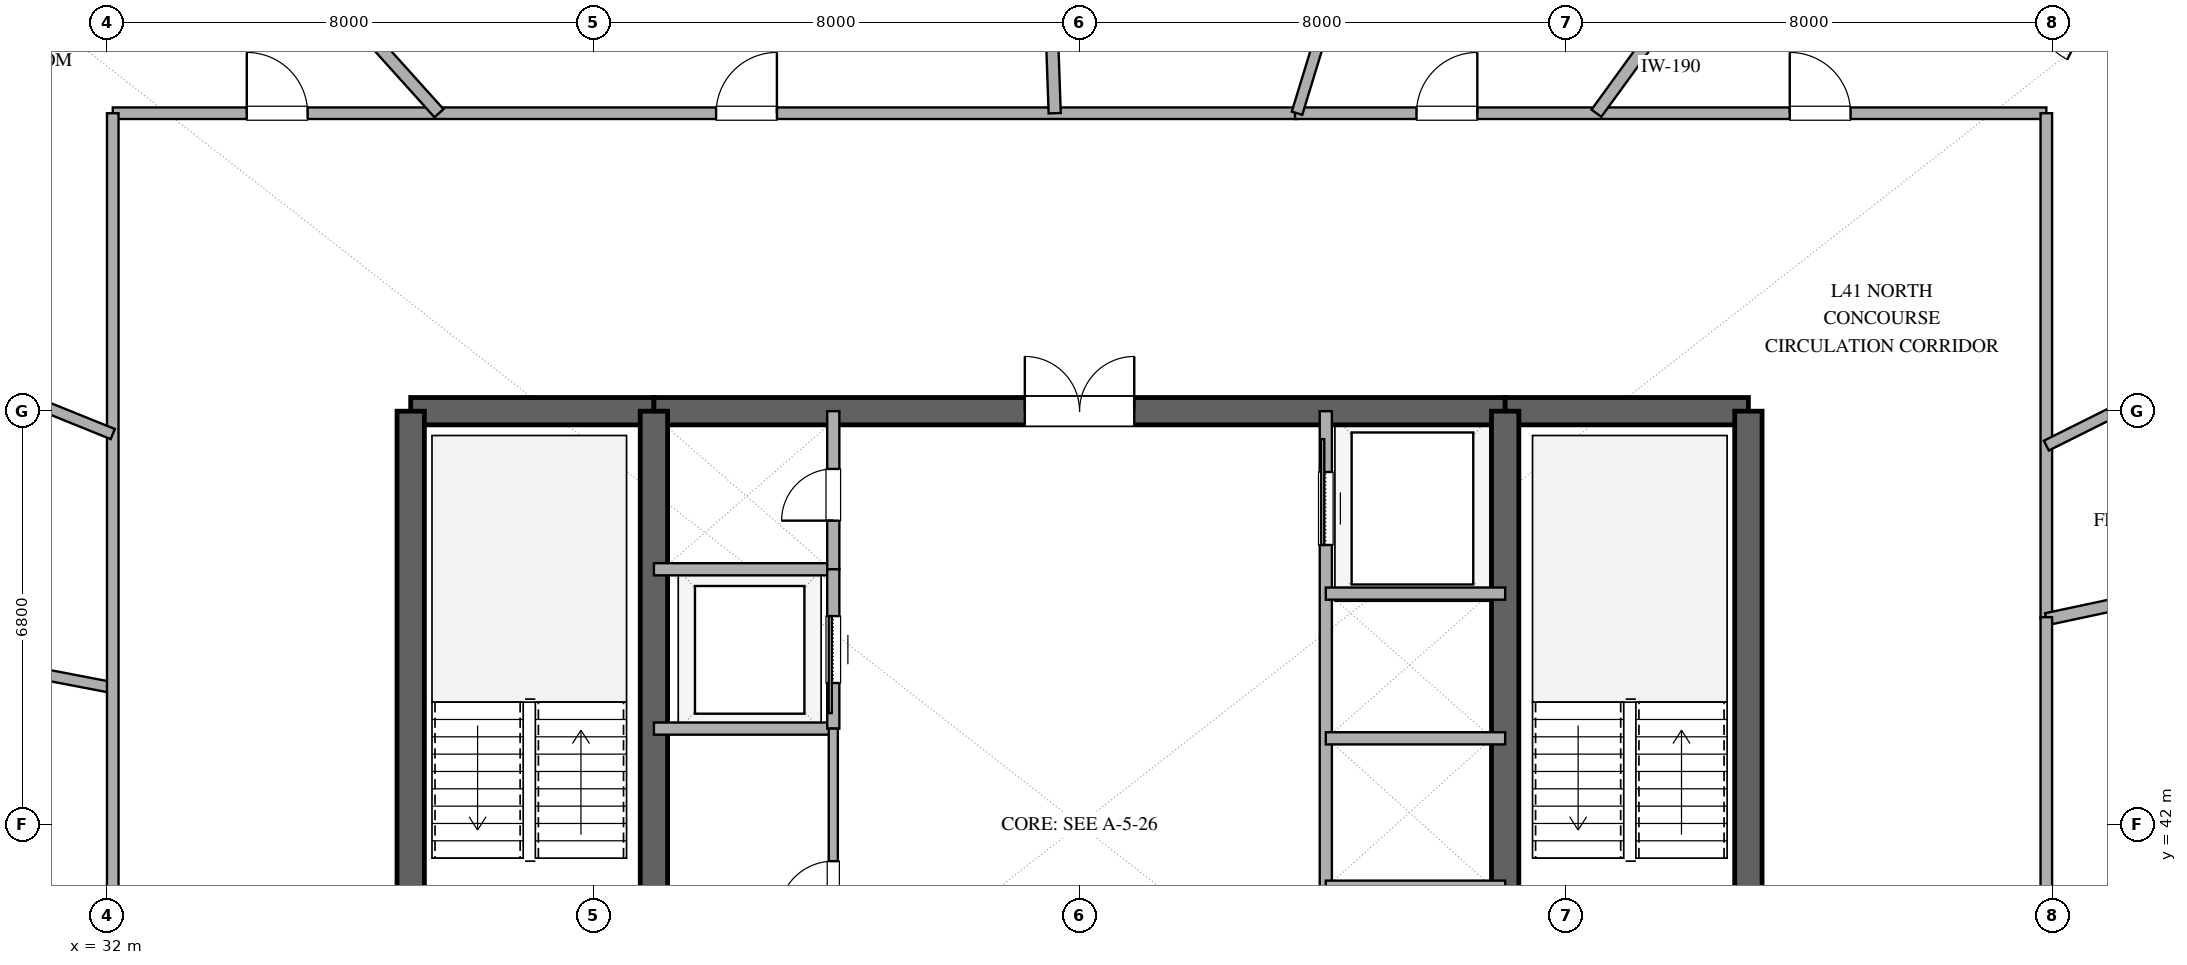
"""IFC4 building model, lengths in metres.
Left out: names, types, materials, properties, quantities, classifications, styles, units other than length and angle.
Written with IfcOpenShell. Run it as: python <this file> out.ifc"""

import sys

from ifc_helpers import new_model, si_unit, direction, frame, frame_2d, origin, place, context, subcontext, project, spatial, rectangle, extrude, element, fill, save


model = new_model("IFC4")
c1 = context("Model", 3, precision=1e-05, world=origin(), true_north=direction((0.0, 1.0)))
c2 = subcontext(c1, "Body", "Model", "MODEL_VIEW")
j1 = project(units=[si_unit("LENGTHUNIT", "METRE"), si_unit("PLANEANGLEUNIT", "RADIAN")], contexts=[c1])
p1 = place(None, origin())
s1 = spatial("IfcSite", under=j1, at=p1, CompositionType="ELEMENT")
p2 = place(p1, origin())
s2 = spatial("IfcBuilding", under=s1, at=p2, CompositionType="ELEMENT")
p3 = place(p2, frame((0.0, 0.0, 165.0)))
s3 = spatial("IfcBuildingStorey", under=s2, at=p3, CompositionType="ELEMENT", Elevation=165.0)
p4 = place(p3, frame((37.0, 48.8, 0.0), z_axis=(0.0, 0.0, 1.0), x_axis=(1.0, 0.0, 0.0)))
e1 = element("IfcWall", 1, at=p4, inside=s3, PredefinedType="SHEAR", context=c2, shape_type="SweptSolid", body=[
    extrude(rectangle(XDim=4.0, YDim=0.45, at=frame_2d((2.0, 0.0))), origin(), (0.0, 0.0, 1.0), 3.38),
])
p5 = place(p3, frame((41.0, 48.8, 0.0), z_axis=(0.0, 0.0, 1.0), x_axis=(1.0, 0.0, 0.0)))
e2 = element("IfcWall", 2, at=p5, inside=s3, PredefinedType="SHEAR", context=c2, shape_type="SweptSolid", body=[
    extrude(rectangle(XDim=14.0, YDim=0.45, at=frame_2d((7.0, 0.0))), origin(), (0.0, 0.0, 1.0), 3.38),
])
p6 = place(p5, frame((6.1, 0.0, 0.0)))
e3 = element("IfcOpeningElement", 3, at=p6, cuts=e2, PredefinedType="OPENING", context=c2, shape_type="SweptSolid", body=[
    extrude(rectangle(XDim=1.8, YDim=2.25, at=frame_2d((0.9, 1.125))), frame((0.0, 0.235, 0.0), z_axis=(0.0, -1.0, 0.0), x_axis=(1.0, 0.0, 0.0)), (0.0, 0.0, 1.0), 0.47),
])
p7 = place(p3, frame((55.0, 48.8, 0.0), z_axis=(0.0, 0.0, 1.0), x_axis=(1.0, 0.0, 0.0)))
e4 = element("IfcWall", 4, at=p7, inside=s3, PredefinedType="SHEAR", context=c2, shape_type="SweptSolid", body=[
    extrude(rectangle(XDim=4.0, YDim=0.45, at=frame_2d((2.0, 0.0))), origin(), (0.0, 0.0, 1.0), 3.38),
])
for number, where, z_axis, x_axis in (
    (5, (37.0, 35.2, 0.0), (0.0, 0.0, 1.0), (0.0, 1.0, 0.0)),
    (6, (59.0, 35.2, 0.0), (0.0, 0.0, 1.0), (0.0, 1.0, 0.0)),
):
    element("IfcWall", number, at=place(p3, frame(where, z_axis=z_axis, x_axis=x_axis)), inside=s3, PredefinedType="SHEAR", context=c2, shape_type="SweptSolid", body=[
        extrude(rectangle(XDim=13.6, YDim=0.45, at=frame_2d((6.8, 0.0))), origin(), (0.0, 0.0, 1.0), 3.38),
    ])
p8 = place(p3, frame((41.0, 35.2, 0.0), z_axis=(0.0, 0.0, 1.0), x_axis=(0.0, 1.0, 0.0)))
e7 = element("IfcWall", 7, at=p8, inside=s3, PredefinedType="SHEAR", context=c2, shape_type="SweptSolid", body=[
    extrude(rectangle(XDim=13.6, YDim=0.45, at=frame_2d((6.8, 0.0))), origin(), (0.0, 0.0, 1.0), 3.38),
])
p9 = place(p8, frame((1.15, 0.0, 0.0)))
e8 = element("IfcOpeningElement", 8, at=p9, cuts=e7, PredefinedType="OPENING", context=c2, shape_type="SweptSolid", body=[
    extrude(rectangle(XDim=1.1, YDim=2.2, at=frame_2d((0.55, 1.1))), frame((0.0, 0.235, 0.0), z_axis=(0.0, -1.0, 0.0), x_axis=(1.0, 0.0, 0.0)), (0.0, 0.0, 1.0), 0.47),
])
p10 = place(p3, frame((55.0, 35.2, 0.0), z_axis=(0.0, 0.0, 1.0), x_axis=(0.0, 1.0, 0.0)))
e9 = element("IfcWall", 9, at=p10, inside=s3, PredefinedType="SHEAR", context=c2, shape_type="SweptSolid", body=[
    extrude(rectangle(XDim=13.6, YDim=0.45, at=frame_2d((6.8, 0.0))), origin(), (0.0, 0.0, 1.0), 3.38),
])
p11 = place(p10, frame((1.15, 0.0, 0.0)))
e10 = element("IfcOpeningElement", 10, at=p11, cuts=e9, PredefinedType="OPENING", context=c2, shape_type="SweptSolid", body=[
    extrude(rectangle(XDim=1.1, YDim=2.2, at=frame_2d((0.55, 1.1))), frame((0.0, 0.235, 0.0), z_axis=(0.0, -1.0, 0.0), x_axis=(1.0, 0.0, 0.0)), (0.0, 0.0, 1.0), 0.47),
])
p12 = place(p3, frame((41.0, 46.2, 0.0), z_axis=(0.0, 0.0, 1.0), x_axis=(1.0, 0.0, 0.0)))
e11 = element("IfcWall", 11, at=p12, inside=s3, PredefinedType="SOLIDWALL", context=c2, shape_type="SweptSolid", body=[
    extrude(rectangle(XDim=2.95, YDim=0.2, at=frame_2d((1.475, 0.0))), origin(), (0.0, 0.0, 1.0), 2.74),
])
p13 = place(p3, frame((43.95, 46.2, 0.0), z_axis=(0.0, 0.0, 1.0), x_axis=(0.0, 1.0, 0.0)))
e12 = element("IfcWall", 12, at=p13, inside=s3, PredefinedType="SOLIDWALL", context=c2, shape_type="SweptSolid", body=[
    extrude(rectangle(XDim=2.6, YDim=0.2, at=frame_2d((1.3, 0.0))), origin(), (0.0, 0.0, 1.0), 2.74),
])
p14 = place(p13, frame((0.8, 0.0, 0.0)))
e13 = element("IfcOpeningElement", 13, at=p14, cuts=e12, PredefinedType="OPENING", context=c2, shape_type="SweptSolid", body=[
    extrude(rectangle(XDim=0.85, YDim=2.15, at=frame_2d((0.425, 1.075))), frame((0.0, 0.11, 0.0), z_axis=(0.0, -1.0, 0.0), x_axis=(1.0, 0.0, 0.0)), (0.0, 0.0, 1.0), 0.22),
])
p15 = place(p3, frame((41.0, 43.58, 0.0), z_axis=(0.0, 0.0, 1.0), x_axis=(1.0, 0.0, 0.0)))
e14 = element("IfcWall", 14, at=p15, inside=s3, PredefinedType="SOLIDWALL", context=c2, shape_type="SweptSolid", body=[
    extrude(rectangle(XDim=2.95, YDim=0.2, at=frame_2d((1.475, 0.0))), origin(), (0.0, 0.0, 1.0), 2.74),
])
p16 = place(p3, frame((43.95, 43.58, 0.0), z_axis=(0.0, 0.0, 1.0), x_axis=(0.0, 1.0, 0.0)))
e15 = element("IfcWall", 15, at=p16, inside=s3, PredefinedType="SOLIDWALL", context=c2, shape_type="SweptSolid", body=[
    extrude(rectangle(XDim=2.62, YDim=0.2, at=frame_2d((1.31, 0.0))), origin(), (0.0, 0.0, 1.0), 2.74),
])
p17 = place(p16, frame((0.75, 0.0, 0.0)))
e16 = element("IfcOpeningElement", 16, at=p17, cuts=e15, PredefinedType="OPENING", context=c2, shape_type="SweptSolid", body=[
    extrude(rectangle(XDim=1.1, YDim=2.2, at=frame_2d((0.55, 1.1))), frame((0.0, 0.11, 0.0), z_axis=(0.0, -1.0, 0.0), x_axis=(1.0, 0.0, 0.0)), (0.0, 0.0, 1.0), 0.22),
])
p18 = place(p3, frame((43.95, 38.4, 0.0), z_axis=(0.0, 0.0, 1.0), x_axis=(0.0, 1.0, 0.0)))
e17 = element("IfcWall", 17, at=p18, inside=s3, PredefinedType="PARTITIONING", context=c2, shape_type="SweptSolid", body=[
    extrude(rectangle(XDim=5.18, YDim=0.15, at=frame_2d((2.59, 0.0))), origin(), (0.0, 0.0, 1.0), 2.74),
])
p19 = place(p18, frame((2.1, 0.0, 0.0)))
e18 = element("IfcOpeningElement", 18, at=p19, cuts=e17, PredefinedType="OPENING", context=c2, shape_type="SweptSolid", body=[
    extrude(rectangle(XDim=0.9, YDim=2.15, at=frame_2d((0.45, 1.075))), frame((0.0, 0.085, 0.0), z_axis=(0.0, -1.0, 0.0), x_axis=(1.0, 0.0, 0.0)), (0.0, 0.0, 1.0), 0.17),
])
p20 = place(p3, frame((52.05, 38.4, 0.0), z_axis=(0.0, 0.0, 1.0), x_axis=(0.0, 1.0, 0.0)))
e19 = element("IfcWall", 19, at=p20, inside=s3, PredefinedType="SOLIDWALL", context=c2, shape_type="SweptSolid", body=[
    extrude(rectangle(XDim=10.4, YDim=0.2, at=frame_2d((5.2, 0.0))), origin(), (0.0, 0.0, 1.0), 2.74),
])
p21 = place(p20, frame((0.7, 0.0, 0.0)))
e20 = element("IfcOpeningElement", 20, at=p21, cuts=e19, PredefinedType="OPENING", context=c2, shape_type="SweptSolid", body=[
    extrude(rectangle(XDim=1.1, YDim=2.2, at=frame_2d((0.55, 1.1))), frame((0.0, 0.11, 0.0), z_axis=(0.0, -1.0, 0.0), x_axis=(1.0, 0.0, 0.0)), (0.0, 0.0, 1.0), 0.22),
])
p22 = place(p20, frame((8.2, 0.0, 0.0)))
e21 = element("IfcOpeningElement", 21, at=p22, cuts=e19, PredefinedType="OPENING", context=c2, shape_type="SweptSolid", body=[
    extrude(rectangle(XDim=1.2, YDim=2.2, at=frame_2d((0.6, 1.1))), frame((0.0, 0.11, 0.0), z_axis=(0.0, -1.0, 0.0), x_axis=(1.0, 0.0, 0.0)), (0.0, 0.0, 1.0), 0.22),
])
for number, where, z_axis, x_axis in (
    (22, (52.05, 40.98, 0.0), (0.0, 0.0, 1.0), (1.0, 0.0, 0.0)),
    (23, (52.05, 43.42, 0.0), (0.0, 0.0, 1.0), (1.0, 0.0, 0.0)),
    (24, (52.05, 45.8, 0.0), (0.0, 0.0, 1.0), (1.0, 0.0, 0.0)),
):
    element("IfcWall", number, at=place(p3, frame(where, z_axis=z_axis, x_axis=x_axis)), inside=s3, PredefinedType="SOLIDWALL", context=c2, shape_type="SweptSolid", body=[
        extrude(rectangle(XDim=2.95, YDim=0.2, at=frame_2d((1.475, 0.0))), origin(), (0.0, 0.0, 1.0), 2.74),
    ])
p23 = place(p3, frame((32.1, 53.7, 0.0), z_axis=(0.0, 0.0, 1.0), x_axis=(1.0, 0.0, 0.0)))
e25 = element("IfcWall", 25, at=p23, inside=s3, PredefinedType="PARTITIONING", context=c2, shape_type="SweptSolid", body=[
    extrude(rectangle(XDim=19.477, YDim=0.19, at=frame_2d((9.738, 0.0))), origin(), (0.0, 0.0, 1.0), 2.74),
])
p24 = place(p23, frame((9.923, 0.0, 0.0)))
e26 = element("IfcOpeningElement", 26, at=p24, cuts=e25, PredefinedType="OPENING", context=c2, shape_type="SweptSolid", body=[
    extrude(rectangle(XDim=1.0, YDim=2.2, at=frame_2d((0.5, 1.1))), frame((0.0, 0.105, 0.0), z_axis=(0.0, -1.0, 0.0), x_axis=(1.0, 0.0, 0.0)), (0.0, 0.0, 1.0), 0.21),
])
p25 = place(p23, frame((2.204, 0.0, 0.0)))
e27 = element("IfcOpeningElement", 27, at=p25, cuts=e25, PredefinedType="OPENING", context=c2, shape_type="SweptSolid", body=[
    extrude(rectangle(XDim=1.0, YDim=2.2, at=frame_2d((0.5, 1.1))), frame((0.0, 0.105, 0.0), z_axis=(0.0, -1.0, 0.0), x_axis=(1.0, 0.0, 0.0)), (0.0, 0.0, 1.0), 0.21),
])
p26 = place(p3, frame((51.543, 53.7, 0.0), z_axis=(0.0, 0.0, 1.0), x_axis=(1.0, 0.0, 0.0)))
e28 = element("IfcWall", 28, at=p26, inside=s3, PredefinedType="PARTITIONING", context=c2, shape_type="SweptSolid", body=[
    extrude(rectangle(XDim=12.356, YDim=0.19, at=frame_2d((6.178, 0.0))), origin(), (0.0, 0.0, 1.0), 2.74),
])
p27 = place(p26, frame((8.137, 0.0, 0.0)))
e29 = element("IfcOpeningElement", 29, at=p27, cuts=e28, PredefinedType="OPENING", context=c2, shape_type="SweptSolid", body=[
    extrude(rectangle(XDim=1.0, YDim=2.2, at=frame_2d((0.5, 1.1))), frame((0.0, 0.105, 0.0), z_axis=(0.0, -1.0, 0.0), x_axis=(1.0, 0.0, 0.0)), (0.0, 0.0, 1.0), 0.21),
])
p28 = place(p26, frame((1.998, 0.0, 0.0)))
e30 = element("IfcOpeningElement", 30, at=p28, cuts=e28, PredefinedType="OPENING", context=c2, shape_type="SweptSolid", body=[
    extrude(rectangle(XDim=1.0, YDim=2.2, at=frame_2d((0.5, 1.1))), frame((0.0, 0.105, 0.0), z_axis=(0.0, -1.0, 0.0), x_axis=(1.0, 0.0, 0.0)), (0.0, 0.0, 1.0), 0.21),
])
p29 = place(p3, frame((37.465, 53.7, 0.0), z_axis=(0.0, 0.0, 1.0), x_axis=(-0.669128292476, 0.7431469089, 0.0)))
e31 = element("IfcWall", 31, at=p29, inside=s3, PredefinedType="PARTITIONING", context=c2, shape_type="SweptSolid", body=[
    extrude(rectangle(XDim=7.339, YDim=0.2, at=frame_2d((3.669, 0.0))), origin(), (0.0, 0.0, 1.0), 2.74),
])
p30 = place(p3, frame((63.9, 53.7, 0.0), z_axis=(0.0, 0.0, 1.0), x_axis=(0.0, -1.0, 0.0)))
e32 = element("IfcWall", 32, at=p30, inside=s3, PredefinedType="PARTITIONING", context=c2, shape_type="SweptSolid", body=[
    extrude(rectangle(XDim=8.32, YDim=0.19, at=frame_2d((4.16, 0.0))), origin(), (0.0, 0.0, 1.0), 2.74),
])
p31 = place(p3, frame((32.1, 44.253, 0.0), z_axis=(0.0, 0.0, 1.0), x_axis=(-0.982102846986, 0.188345421878, 0.0)))
e33 = element("IfcWall", 33, at=p31, inside=s3, PredefinedType="PLUMBINGWALL", context=c2, shape_type="SweptSolid", body=[
    extrude(rectangle(XDim=5.448, YDim=0.18, at=frame_2d((2.724, 0.0))), origin(), (0.0, 0.0, 1.0), 2.74),
])
p32 = place(p31, frame((2.299, 0.0, 0.0)))
e34 = element("IfcOpeningElement", 34, at=p32, cuts=e33, PredefinedType="OPENING", context=c2, shape_type="SweptSolid", body=[
    extrude(rectangle(XDim=0.85, YDim=2.1, at=frame_2d((0.425, 1.05))), frame((0.0, 0.1, 0.0), z_axis=(0.0, -1.0, 0.0), x_axis=(1.0, 0.0, 0.0)), (0.0, 0.0, 1.0), 0.2),
])
p33 = place(p3, frame((32.1, 40.856, 0.0), z_axis=(0.0, 0.0, 1.0), x_axis=(0.0, 1.0, 0.0)))
e35 = element("IfcWall", 35, at=p33, inside=s3, PredefinedType="PARTITIONING", context=c2, shape_type="SweptSolid", body=[
    extrude(rectangle(XDim=12.844, YDim=0.19, at=frame_2d((6.422, 0.0))), origin(), (0.0, 0.0, 1.0), 2.74),
])
p34 = place(p3, frame((63.9, 45.38, 0.0), z_axis=(0.0, 0.0, 1.0), x_axis=(0.978145779981, 0.207920256603, 0.0)))
e36 = element("IfcWall", 36, at=p34, inside=s3, PredefinedType="PARTITIONING", context=c2, shape_type="SweptSolid", body=[
    extrude(rectangle(XDim=6.789, YDim=0.2, at=frame_2d((3.395, 0.0))), origin(), (0.0, 0.0, 1.0), 2.74),
])
p35 = place(p3, frame((63.9, 45.412, 0.0), z_axis=(0.0, 0.0, 1.0), x_axis=(0.0, -1.0, 0.0)))
e37 = element("IfcWall", 37, at=p35, inside=s3, PredefinedType="PARTITIONING", context=c2, shape_type="SweptSolid", body=[
    extrude(rectangle(XDim=4.987, YDim=0.19, at=frame_2d((2.494, 0.0))), origin(), (0.0, 0.0, 1.0), 2.74),
])
p36 = place(p3, frame((61.274, 60.27, 0.0), z_axis=(0.0, 0.0, 1.0), x_axis=(-0.587785528328, -0.809016793823, 0.0)))
e38 = element("IfcWall", 38, at=p36, inside=s3, PredefinedType="PARTITIONING", context=c2, shape_type="SweptSolid", body=[
    extrude(rectangle(XDim=8.121, YDim=0.2, at=frame_2d((4.061, 0.0))), origin(), (0.0, 0.0, 1.0), 2.74),
])
p37 = place(p3, frame((47.378, 59.821, 0.0), z_axis=(0.0, 0.0, 1.0), x_axis=(0.034876866147, -0.999391617039, 0.0)))
e39 = element("IfcWall", 39, at=p37, inside=s3, PredefinedType="PARTITIONING", context=c2, shape_type="SweptSolid", body=[
    extrude(rectangle(XDim=6.125, YDim=0.2, at=frame_2d((3.062, 0.0))), origin(), (0.0, 0.0, 1.0), 2.74),
])
p38 = place(p3, frame((52.797, 57.69, 0.0), z_axis=(0.0, 0.0, 1.0), x_axis=(-0.29241622154, -0.956291144673, 0.0)))
e40 = element("IfcWall", 40, at=p38, inside=s3, PredefinedType="PLUMBINGWALL", context=c2, shape_type="SweptSolid", body=[
    extrude(rectangle(XDim=4.173, YDim=0.18, at=frame_2d((2.086, 0.0))), origin(), (0.0, 0.0, 1.0), 2.74),
])
p39 = place(p3, frame((67.152, 49.856, 0.0), z_axis=(0.0, 0.0, 1.0), x_axis=(-0.894843352961, -0.446380301605, 0.0)))
e41 = element("IfcWall", 41, at=p39, inside=s3, PredefinedType="PLUMBINGWALL", context=c2, shape_type="SweptSolid", body=[
    extrude(rectangle(XDim=3.634, YDim=0.18, at=frame_2d((1.817, 0.0))), origin(), (0.0, 0.0, 1.0), 2.74),
])
p40 = place(p39, frame((1.392, 0.0, 0.0)))
e42 = element("IfcOpeningElement", 42, at=p40, cuts=e41, PredefinedType="OPENING", context=c2, shape_type="SweptSolid", body=[
    extrude(rectangle(XDim=0.85, YDim=2.1, at=frame_2d((0.425, 1.05))), frame((0.0, 0.1, 0.0), z_axis=(0.0, -1.0, 0.0), x_axis=(1.0, 0.0, 0.0)), (0.0, 0.0, 1.0), 0.2),
])
p41 = place(p3, frame((28.773, 49.768, 0.0), z_axis=(0.0, 0.0, 1.0), x_axis=(0.927195040954, -0.374578904945, 0.0)))
e43 = element("IfcWall", 43, at=p41, inside=s3, PredefinedType="PLUMBINGWALL", context=c2, shape_type="SweptSolid", body=[
    extrude(rectangle(XDim=3.589, YDim=0.18, at=frame_2d((1.794, 0.0))), origin(), (0.0, 0.0, 1.0), 2.74),
])
p42 = place(p6, origin())
e44 = element("IfcDoor", 44, at=p42, inside=s3, OperationType="DOUBLE_DOOR_SINGLE_SWING", PredefinedType="DOOR", context=c2, shape_type="SweptSolid", body=[
    extrude(rectangle(XDim=1.8, YDim=2.25, at=frame_2d((0.9, 1.125))), frame((0.0, 0.025, 0.0), z_axis=(0.0, -1.0, 0.0), x_axis=(1.0, 0.0, 0.0)), (0.0, 0.0, 1.0), 0.05),
])
fill(e3, e44)
p43 = place(p14, origin())
e45 = element("IfcDoor", 45, at=p43, inside=s3, OperationType="SINGLE_SWING_LEFT", PredefinedType="DOOR", context=c2, shape_type="SweptSolid", body=[
    extrude(rectangle(XDim=0.85, YDim=2.15, at=frame_2d((0.425, 1.075))), frame((0.0, 0.025, 0.0), z_axis=(0.0, -1.0, 0.0), x_axis=(1.0, 0.0, 0.0)), (0.0, 0.0, 1.0), 0.05),
])
fill(e13, e45)
p44 = place(p17, origin())
e46 = element("IfcDoor", 46, at=p44, inside=s3, OperationType="SLIDING_TO_LEFT", PredefinedType="DOOR", context=c2, shape_type="SweptSolid", body=[
    extrude(rectangle(XDim=1.1, YDim=2.2, at=frame_2d((0.55, 1.1))), frame((0.0, 0.025, 0.0), z_axis=(0.0, -1.0, 0.0), x_axis=(1.0, 0.0, 0.0)), (0.0, 0.0, 1.0), 0.05),
])
fill(e16, e46)
p45 = place(p19, origin())
e47 = element("IfcDoor", 47, at=p45, inside=s3, OperationType="SINGLE_SWING_LEFT", PredefinedType="DOOR", context=c2, shape_type="SweptSolid", body=[
    extrude(rectangle(XDim=0.9, YDim=2.15, at=frame_2d((0.45, 1.075))), frame((0.0, 0.025, 0.0), z_axis=(0.0, -1.0, 0.0), x_axis=(1.0, 0.0, 0.0)), (0.0, 0.0, 1.0), 0.05),
])
fill(e18, e47)
p46 = place(p22, origin())
e48 = element("IfcDoor", 48, at=p46, inside=s3, OperationType="SLIDING_TO_RIGHT", PredefinedType="DOOR", context=c2, shape_type="SweptSolid", body=[
    extrude(rectangle(XDim=1.2, YDim=2.2, at=frame_2d((0.6, 1.1))), frame((0.0, 0.025, 0.0), z_axis=(0.0, -1.0, 0.0), x_axis=(1.0, 0.0, 0.0)), (0.0, 0.0, 1.0), 0.05),
])
fill(e21, e48)
p47 = place(p24, origin())
e49 = element("IfcDoor", 49, at=p47, inside=s3, OperationType="SINGLE_SWING_RIGHT", PredefinedType="DOOR", context=c2, shape_type="SweptSolid", body=[
    extrude(rectangle(XDim=1.0, YDim=2.2, at=frame_2d((0.5, 1.1))), frame((0.0, 0.025, 0.0), z_axis=(0.0, -1.0, 0.0), x_axis=(1.0, 0.0, 0.0)), (0.0, 0.0, 1.0), 0.05),
])
fill(e26, e49)
p48 = place(p25, origin())
e50 = element("IfcDoor", 50, at=p48, inside=s3, OperationType="SINGLE_SWING_LEFT", PredefinedType="DOOR", context=c2, shape_type="SweptSolid", body=[
    extrude(rectangle(XDim=1.0, YDim=2.2, at=frame_2d((0.5, 1.1))), frame((0.0, 0.025, 0.0), z_axis=(0.0, -1.0, 0.0), x_axis=(1.0, 0.0, 0.0)), (0.0, 0.0, 1.0), 0.05),
])
fill(e27, e50)
p49 = place(p27, origin())
e51 = element("IfcDoor", 51, at=p49, inside=s3, OperationType="SINGLE_SWING_LEFT", PredefinedType="DOOR", context=c2, shape_type="SweptSolid", body=[
    extrude(rectangle(XDim=1.0, YDim=2.2, at=frame_2d((0.5, 1.1))), frame((0.0, 0.025, 0.0), z_axis=(0.0, -1.0, 0.0), x_axis=(1.0, 0.0, 0.0)), (0.0, 0.0, 1.0), 0.05),
])
fill(e29, e51)
p50 = place(p28, origin())
e52 = element("IfcDoor", 52, at=p50, inside=s3, OperationType="SINGLE_SWING_RIGHT", PredefinedType="DOOR", context=c2, shape_type="SweptSolid", body=[
    extrude(rectangle(XDim=1.0, YDim=2.2, at=frame_2d((0.5, 1.1))), frame((0.0, 0.025, 0.0), z_axis=(0.0, -1.0, 0.0), x_axis=(1.0, 0.0, 0.0)), (0.0, 0.0, 1.0), 0.05),
])
fill(e30, e52)
save(model, sys.argv[1])
